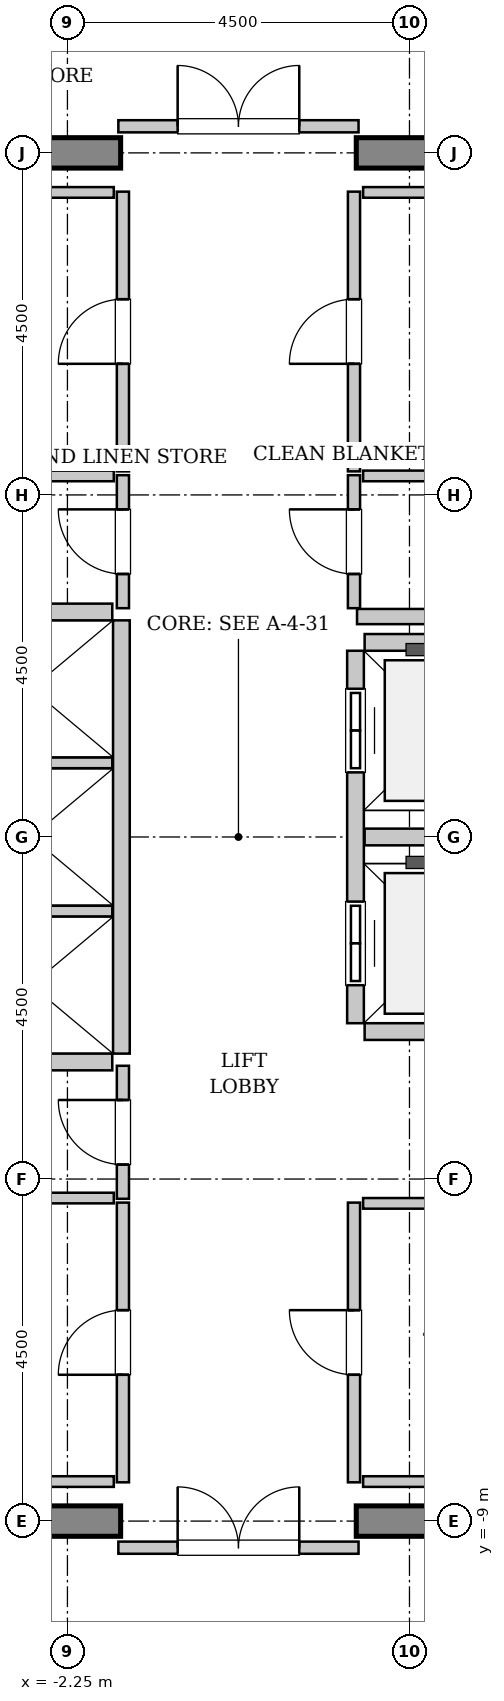
"""IFC4 building model, lengths in metres.
Left out: names, types, materials, properties, quantities, classifications, styles, units other than length and angle.
Written with IfcOpenShell. Run it as: python <this file> out.ifc"""

import sys

from ifc_helpers import new_model, si_unit, direction, frame, frame_2d, origin, place, context, subcontext, project, spatial, rectangle, extrude, source, transform, mapped, element, fill, save


model = new_model("IFC4")
c1 = context("Model", 3, precision=1e-05, world=origin(), true_north=direction((0.0, 1.0)))
c2 = subcontext(c1, "Body", "Model", "MODEL_VIEW")
j1 = project(units=[si_unit("LENGTHUNIT", "METRE"), si_unit("PLANEANGLEUNIT", "RADIAN")], contexts=[c1])
p1 = place(None, origin())
s1 = spatial("IfcSite", under=j1, at=p1, CompositionType="ELEMENT")
p2 = place(p1, origin())
s2 = spatial("IfcBuilding", under=s1, at=p2, CompositionType="ELEMENT")
p3 = place(p2, frame((0.0, 0.0, 349.0)))
s3 = spatial("IfcBuildingStorey", under=s2, at=p3, CompositionType="ELEMENT", Elevation=349.0)
m1 = source(origin(), c2, "Body", "SweptSolid", [
    extrude(rectangle(XDim=9.9, YDim=0.4, at=frame_2d((4.95, 0.0))), origin(), (0.0, 0.0, 1.0), 4.8),
])
for number, where, z_axis, x_axis in (
    (1, (-11.45, 9.0, 0.0), (0.0, 0.0, 1.0), (1.0, 0.0, 0.0)),
    (2, (1.55, 9.0, 0.0), (0.0, 0.0, 1.0), (1.0, 0.0, 0.0)),
    (3, (-11.45, -9.0, 0.0), (0.0, 0.0, 1.0), (1.0, 0.0, 0.0)),
    (4, (1.55, -9.0, 0.0), (0.0, 0.0, 1.0), (1.0, 0.0, 0.0)),
):
    element("IfcWall", number, at=place(p3, frame(where, z_axis=z_axis, x_axis=x_axis)), inside=s3, PredefinedType="SHEAR", context=c2, shape_type="MappedRepresentation", body=[
        mapped(m1, transform((0.0, 0.0, 0.0), x_axis=(1.0, 0.0, 0.0), y_axis=(0.0, 1.0, 0.0), z_axis=(0.0, 0.0, 1.0), scale=1.0)),
    ])
m2 = source(origin(), c2, "Body", "SweptSolid", [
    extrude(rectangle(XDim=5.7, YDim=0.22, at=frame_2d((2.85, 0.0))), origin(), (0.0, 0.0, 1.0), 4.485),
])
p4 = place(p3, frame((-1.54, -2.85, 0.0), z_axis=(0.0, 0.0, 1.0), x_axis=(0.0, 1.0, 0.0)))
e5 = element("IfcWall", 5, at=p4, inside=s3, PredefinedType="SOLIDWALL", context=c2, shape_type="MappedRepresentation", body=[
    mapped(m2, transform((0.0, 0.0, 0.0), x_axis=(1.0, 0.0, 0.0), y_axis=(0.0, 1.0, 0.0), z_axis=(0.0, 0.0, 1.0), scale=1.0)),
])
m3 = source(origin(), c2, "Body", "SweptSolid", [
    extrude(rectangle(XDim=2.13, YDim=0.22, at=frame_2d((1.065, 0.0))), origin(), (0.0, 0.0, 1.0), 4.485),
])
p5 = place(p3, frame((-3.79, -2.96, 0.0), z_axis=(0.0, 0.0, 1.0), x_axis=(1.0, 0.0, 0.0)))
e6 = element("IfcWall", 6, at=p5, inside=s3, PredefinedType="SOLIDWALL", context=c2, shape_type="MappedRepresentation", body=[
    mapped(m3, transform((0.0, 0.0, 0.0), x_axis=(1.0, 0.0, 0.0), y_axis=(0.0, 1.0, 0.0), z_axis=(0.0, 0.0, 1.0), scale=1.0)),
])
m4 = source(origin(), c2, "Body", "SweptSolid", [
    extrude(rectangle(XDim=2.13, YDim=0.14, at=frame_2d((1.065, 0.0))), origin(), (0.0, 0.0, 1.0), 4.485),
])
for number, where, z_axis, x_axis in (
    (7, (-3.79, -0.975, 0.0), (0.0, 0.0, 1.0), (1.0, 0.0, 0.0)),
    (8, (-3.79, 0.975, 0.0), (0.0, 0.0, 1.0), (1.0, 0.0, 0.0)),
):
    element("IfcWall", number, at=place(p3, frame(where, z_axis=z_axis, x_axis=x_axis)), inside=s3, PredefinedType="PARTITIONING", context=c2, shape_type="MappedRepresentation", body=[
        mapped(m4, transform((0.0, 0.0, 0.0), x_axis=(1.0, 0.0, 0.0), y_axis=(0.0, 1.0, 0.0), z_axis=(0.0, 0.0, 1.0), scale=1.0)),
    ])
p6 = place(p3, frame((-1.66, 2.96, 0.0), z_axis=(0.0, 0.0, 1.0), x_axis=(-1.0, 0.0, 0.0)))
e9 = element("IfcWall", 9, at=p6, inside=s3, PredefinedType="SOLIDWALL", context=c2, shape_type="MappedRepresentation", body=[
    mapped(m3, transform((0.0, 0.0, 0.0), x_axis=(1.0, 0.0, 0.0), y_axis=(0.0, 1.0, 0.0), z_axis=(0.0, 0.0, 1.0), scale=1.0)),
])
m5 = source(origin(), c2, "Body", "SweptSolid", [
    extrude(rectangle(XDim=4.9, YDim=0.22, at=frame_2d((2.45, 0.0))), origin(), (0.0, 0.0, 1.0), 4.485),
])
p7 = place(p3, frame((1.54, 2.45, 0.0), z_axis=(0.0, 0.0, 1.0), x_axis=(0.0, -1.0, 0.0)))
e10 = element("IfcWall", 10, at=p7, inside=s3, PredefinedType="SOLIDWALL", context=c2, shape_type="MappedRepresentation", body=[
    mapped(m5, transform((0.0, 0.0, 0.0), x_axis=(1.0, 0.0, 0.0), y_axis=(0.0, 1.0, 0.0), z_axis=(0.0, 0.0, 1.0), scale=1.0)),
])
p8 = place(p7, frame((3.3, 0.0, 0.0)))
e11 = element("IfcOpeningElement", 11, at=p8, cuts=e10, PredefinedType="OPENING", context=c2, shape_type="SweptSolid", body=[
    extrude(rectangle(XDim=1.1, YDim=2.2, at=frame_2d((0.55, 1.1))), frame((0.0, 0.12, 0.0), z_axis=(0.0, -1.0, 0.0), x_axis=(1.0, 0.0, 0.0)), (0.0, 0.0, 1.0), 0.24),
])
p9 = place(p7, frame((0.5, 0.0, 0.0)))
e12 = element("IfcOpeningElement", 12, at=p9, cuts=e10, PredefinedType="OPENING", context=c2, shape_type="SweptSolid", body=[
    extrude(rectangle(XDim=1.1, YDim=2.2, at=frame_2d((0.55, 1.1))), frame((0.0, 0.12, 0.0), z_axis=(0.0, -1.0, 0.0), x_axis=(1.0, 0.0, 0.0)), (0.0, 0.0, 1.0), 0.24),
])
for number, where, z_axis, x_axis in (
    (13, (1.66, -2.56, 0.0), (0.0, 0.0, 1.0), (1.0, 0.0, 0.0)),
    (14, (1.66, 0.0, 0.0), (0.0, 0.0, 1.0), (1.0, 0.0, 0.0)),
    (15, (3.79, 2.56, 0.0), (0.0, 0.0, 1.0), (-1.0, 0.0, 0.0)),
):
    element("IfcWall", number, at=place(p3, frame(where, z_axis=z_axis, x_axis=x_axis)), inside=s3, PredefinedType="SOLIDWALL", context=c2, shape_type="MappedRepresentation", body=[
        mapped(m3, transform((0.0, 0.0, 0.0), x_axis=(1.0, 0.0, 0.0), y_axis=(0.0, 1.0, 0.0), z_axis=(0.0, 0.0, 1.0), scale=1.0)),
    ])
m6 = source(origin(), c2, "Body", "SweptSolid", [
    extrude(rectangle(XDim=2.52, YDim=0.2, at=frame_2d((1.26, 0.0))), origin(), (0.0, 0.0, 1.0), 4.485),
])
p10 = place(p3, frame((1.56, 2.9, 0.0), z_axis=(0.0, 0.0, 1.0), x_axis=(1.0, 0.0, 0.0)))
e16 = element("IfcWall", 16, at=p10, inside=s3, PredefinedType="PARTITIONING", context=c2, shape_type="MappedRepresentation", body=[
    mapped(m6, transform((0.0, 0.0, 0.0), x_axis=(1.0, 0.0, 0.0), y_axis=(0.0, 1.0, 0.0), z_axis=(0.0, 0.0, 1.0), scale=1.0)),
])
m7 = source(origin(), c2, "Body", "SweptSolid", [
    extrude(rectangle(XDim=3.16, YDim=0.16, at=frame_2d((1.58, 0.0))), origin(), (0.0, 0.0, 1.0), 3.575),
])
p11 = place(p3, frame((-1.58, 9.35, 0.0), z_axis=(0.0, 0.0, 1.0), x_axis=(1.0, 0.0, 0.0)))
e17 = element("IfcWall", 17, at=p11, inside=s3, PredefinedType="PARTITIONING", context=c2, shape_type="MappedRepresentation", body=[
    mapped(m7, transform((0.0, 0.0, 0.0), x_axis=(1.0, 0.0, 0.0), y_axis=(0.0, 1.0, 0.0), z_axis=(0.0, 0.0, 1.0), scale=1.0)),
])
p12 = place(p11, frame((0.78, 0.0, 0.0)))
e18 = element("IfcOpeningElement", 18, at=p12, cuts=e17, PredefinedType="OPENING", context=c2, shape_type="SweptSolid", body=[
    extrude(rectangle(XDim=1.6, YDim=2.3, at=frame_2d((0.8, 1.15))), frame((0.0, 0.09, 0.0), z_axis=(0.0, -1.0, 0.0), x_axis=(1.0, 0.0, 0.0)), (0.0, 0.0, 1.0), 0.18),
])
p13 = place(p3, frame((-1.58, -9.35, 0.0), z_axis=(0.0, 0.0, 1.0), x_axis=(1.0, 0.0, 0.0)))
e19 = element("IfcWall", 19, at=p13, inside=s3, PredefinedType="PARTITIONING", context=c2, shape_type="MappedRepresentation", body=[
    mapped(m7, transform((0.0, 0.0, 0.0), x_axis=(1.0, 0.0, 0.0), y_axis=(0.0, 1.0, 0.0), z_axis=(0.0, 0.0, 1.0), scale=1.0)),
])
p14 = place(p13, frame((0.78, 0.0, 0.0)))
e20 = element("IfcOpeningElement", 20, at=p14, cuts=e19, PredefinedType="OPENING", context=c2, shape_type="SweptSolid", body=[
    extrude(rectangle(XDim=1.6, YDim=2.3, at=frame_2d((0.8, 1.15))), frame((0.0, 0.09, 0.0), z_axis=(0.0, -1.0, 0.0), x_axis=(1.0, 0.0, 0.0)), (0.0, 0.0, 1.0), 0.18),
])
m8 = source(origin(), c2, "Body", "SweptSolid", [
    extrude(rectangle(XDim=1.75, YDim=0.16, at=frame_2d((0.875, 0.0))), origin(), (0.0, 0.0, 1.0), 4.485),
])
p15 = place(p3, frame((-1.52, 3.01, 0.0), z_axis=(0.0, 0.0, 1.0), x_axis=(0.0, 1.0, 0.0)))
e21 = element("IfcWall", 21, at=p15, inside=s3, PredefinedType="PARTITIONING", context=c2, shape_type="MappedRepresentation", body=[
    mapped(m8, transform((0.0, 0.0, 0.0), x_axis=(1.0, 0.0, 0.0), y_axis=(0.0, 1.0, 0.0), z_axis=(0.0, 0.0, 1.0), scale=1.0)),
])
p16 = place(p15, frame((0.45, 0.0, 0.0)))
e22 = element("IfcOpeningElement", 22, at=p16, cuts=e21, PredefinedType="OPENING", context=c2, shape_type="SweptSolid", body=[
    extrude(rectangle(XDim=0.85, YDim=2.1, at=frame_2d((0.425, 1.05))), frame((0.0, 0.09, 0.0), z_axis=(0.0, -1.0, 0.0), x_axis=(1.0, 0.0, 0.0)), (0.0, 0.0, 1.0), 0.18),
])
m9 = source(origin(), c2, "Body", "SweptSolid", [
    extrude(rectangle(XDim=2.95, YDim=0.14, at=frame_2d((1.475, 0.0))), origin(), (0.0, 0.0, 1.0), 4.485),
])
p17 = place(p3, frame((-4.59, 4.75, 0.0), z_axis=(0.0, 0.0, 1.0), x_axis=(1.0, 0.0, 0.0)))
e23 = element("IfcWall", 23, at=p17, inside=s3, PredefinedType="PARTITIONING", context=c2, shape_type="MappedRepresentation", body=[
    mapped(m9, transform((0.0, 0.0, 0.0), x_axis=(1.0, 0.0, 0.0), y_axis=(0.0, 1.0, 0.0), z_axis=(0.0, 0.0, 1.0), scale=1.0)),
])
m10 = source(origin(), c2, "Body", "SweptSolid", [
    extrude(rectangle(XDim=3.68, YDim=0.16, at=frame_2d((1.84, 0.0))), origin(), (0.0, 0.0, 1.0), 4.485),
])
p18 = place(p3, frame((-1.52, 4.81, 0.0), z_axis=(0.0, 0.0, 1.0), x_axis=(0.0, 1.0, 0.0)))
e24 = element("IfcWall", 24, at=p18, inside=s3, PredefinedType="PARTITIONING", context=c2, shape_type="MappedRepresentation", body=[
    mapped(m10, transform((0.0, 0.0, 0.0), x_axis=(1.0, 0.0, 0.0), y_axis=(0.0, 1.0, 0.0), z_axis=(0.0, 0.0, 1.0), scale=1.0)),
])
p19 = place(p18, frame((1.415, 0.0, 0.0)))
e25 = element("IfcOpeningElement", 25, at=p19, cuts=e24, PredefinedType="OPENING", context=c2, shape_type="SweptSolid", body=[
    extrude(rectangle(XDim=0.85, YDim=2.1, at=frame_2d((0.425, 1.05))), frame((0.0, 0.09, 0.0), z_axis=(0.0, -1.0, 0.0), x_axis=(1.0, 0.0, 0.0)), (0.0, 0.0, 1.0), 0.18),
])
m11 = source(origin(), c2, "Body", "SweptSolid", [
    extrude(rectangle(XDim=3.15, YDim=0.14, at=frame_2d((1.575, 0.0))), origin(), (0.0, 0.0, 1.0), 4.485),
])
p20 = place(p3, frame((-4.79, 8.48, 0.0), z_axis=(0.0, 0.0, 1.0), x_axis=(1.0, 0.0, 0.0)))
e26 = element("IfcWall", 26, at=p20, inside=s3, PredefinedType="PARTITIONING", context=c2, shape_type="MappedRepresentation", body=[
    mapped(m11, transform((0.0, 0.0, 0.0), x_axis=(1.0, 0.0, 0.0), y_axis=(0.0, 1.0, 0.0), z_axis=(0.0, 0.0, 1.0), scale=1.0)),
])
p21 = place(p3, frame((1.52, 3.01, 0.0), z_axis=(0.0, 0.0, 1.0), x_axis=(0.0, 1.0, 0.0)))
e27 = element("IfcWall", 27, at=p21, inside=s3, PredefinedType="PARTITIONING", context=c2, shape_type="MappedRepresentation", body=[
    mapped(m8, transform((0.0, 0.0, 0.0), x_axis=(1.0, 0.0, 0.0), y_axis=(0.0, 1.0, 0.0), z_axis=(0.0, 0.0, 1.0), scale=1.0)),
])
p22 = place(p21, frame((0.45, 0.0, 0.0)))
e28 = element("IfcOpeningElement", 28, at=p22, cuts=e27, PredefinedType="OPENING", context=c2, shape_type="SweptSolid", body=[
    extrude(rectangle(XDim=0.85, YDim=2.1, at=frame_2d((0.425, 1.05))), frame((0.0, 0.09, 0.0), z_axis=(0.0, -1.0, 0.0), x_axis=(1.0, 0.0, 0.0)), (0.0, 0.0, 1.0), 0.18),
])
p23 = place(p3, frame((1.64, 4.75, 0.0), z_axis=(0.0, 0.0, 1.0), x_axis=(1.0, 0.0, 0.0)))
e29 = element("IfcWall", 29, at=p23, inside=s3, PredefinedType="PARTITIONING", context=c2, shape_type="MappedRepresentation", body=[
    mapped(m11, transform((0.0, 0.0, 0.0), x_axis=(1.0, 0.0, 0.0), y_axis=(0.0, 1.0, 0.0), z_axis=(0.0, 0.0, 1.0), scale=1.0)),
])
p24 = place(p3, frame((1.52, 4.81, 0.0), z_axis=(0.0, 0.0, 1.0), x_axis=(0.0, 1.0, 0.0)))
e30 = element("IfcWall", 30, at=p24, inside=s3, PredefinedType="PARTITIONING", context=c2, shape_type="MappedRepresentation", body=[
    mapped(m10, transform((0.0, 0.0, 0.0), x_axis=(1.0, 0.0, 0.0), y_axis=(0.0, 1.0, 0.0), z_axis=(0.0, 0.0, 1.0), scale=1.0)),
])
p25 = place(p24, frame((1.415, 0.0, 0.0)))
e31 = element("IfcOpeningElement", 31, at=p25, cuts=e30, PredefinedType="OPENING", context=c2, shape_type="SweptSolid", body=[
    extrude(rectangle(XDim=0.85, YDim=2.1, at=frame_2d((0.425, 1.05))), frame((0.0, 0.09, 0.0), z_axis=(0.0, -1.0, 0.0), x_axis=(1.0, 0.0, 0.0)), (0.0, 0.0, 1.0), 0.18),
])
p26 = place(p3, frame((1.64, 8.48, 0.0), z_axis=(0.0, 0.0, 1.0), x_axis=(1.0, 0.0, 0.0)))
e32 = element("IfcWall", 32, at=p26, inside=s3, PredefinedType="PARTITIONING", context=c2, shape_type="MappedRepresentation", body=[
    mapped(m11, transform((0.0, 0.0, 0.0), x_axis=(1.0, 0.0, 0.0), y_axis=(0.0, 1.0, 0.0), z_axis=(0.0, 0.0, 1.0), scale=1.0)),
])
p27 = place(p3, frame((-1.52, -4.76, 0.0), z_axis=(0.0, 0.0, 1.0), x_axis=(0.0, 1.0, 0.0)))
e33 = element("IfcWall", 33, at=p27, inside=s3, PredefinedType="PARTITIONING", context=c2, shape_type="MappedRepresentation", body=[
    mapped(m8, transform((0.0, 0.0, 0.0), x_axis=(1.0, 0.0, 0.0), y_axis=(0.0, 1.0, 0.0), z_axis=(0.0, 0.0, 1.0), scale=1.0)),
])
p28 = place(p27, frame((0.45, 0.0, 0.0)))
e34 = element("IfcOpeningElement", 34, at=p28, cuts=e33, PredefinedType="OPENING", context=c2, shape_type="SweptSolid", body=[
    extrude(rectangle(XDim=0.85, YDim=2.1, at=frame_2d((0.425, 1.05))), frame((0.0, 0.09, 0.0), z_axis=(0.0, -1.0, 0.0), x_axis=(1.0, 0.0, 0.0)), (0.0, 0.0, 1.0), 0.18),
])
p29 = place(p3, frame((-4.79, -4.75, 0.0), z_axis=(0.0, 0.0, 1.0), x_axis=(1.0, 0.0, 0.0)))
e35 = element("IfcWall", 35, at=p29, inside=s3, PredefinedType="PARTITIONING", context=c2, shape_type="MappedRepresentation", body=[
    mapped(m11, transform((0.0, 0.0, 0.0), x_axis=(1.0, 0.0, 0.0), y_axis=(0.0, 1.0, 0.0), z_axis=(0.0, 0.0, 1.0), scale=1.0)),
])
p30 = place(p3, frame((-1.52, -8.49, 0.0), z_axis=(0.0, 0.0, 1.0), x_axis=(0.0, 1.0, 0.0)))
e36 = element("IfcWall", 36, at=p30, inside=s3, PredefinedType="PARTITIONING", context=c2, shape_type="MappedRepresentation", body=[
    mapped(m10, transform((0.0, 0.0, 0.0), x_axis=(1.0, 0.0, 0.0), y_axis=(0.0, 1.0, 0.0), z_axis=(0.0, 0.0, 1.0), scale=1.0)),
])
p31 = place(p30, frame((1.415, 0.0, 0.0)))
e37 = element("IfcOpeningElement", 37, at=p31, cuts=e36, PredefinedType="OPENING", context=c2, shape_type="SweptSolid", body=[
    extrude(rectangle(XDim=0.85, YDim=2.1, at=frame_2d((0.425, 1.05))), frame((0.0, 0.09, 0.0), z_axis=(0.0, -1.0, 0.0), x_axis=(1.0, 0.0, 0.0)), (0.0, 0.0, 1.0), 0.18),
])
m12 = source(origin(), c2, "Body", "SweptSolid", [
    extrude(rectangle(XDim=3.03, YDim=0.14, at=frame_2d((1.515, 0.0))), origin(), (0.0, 0.0, 1.0), 4.485),
])
p32 = place(p3, frame((-4.67, -8.48, 0.0), z_axis=(0.0, 0.0, 1.0), x_axis=(1.0, 0.0, 0.0)))
e38 = element("IfcWall", 38, at=p32, inside=s3, PredefinedType="PARTITIONING", context=c2, shape_type="MappedRepresentation", body=[
    mapped(m12, transform((0.0, 0.0, 0.0), x_axis=(1.0, 0.0, 0.0), y_axis=(0.0, 1.0, 0.0), z_axis=(0.0, 0.0, 1.0), scale=1.0)),
])
p33 = place(p3, frame((1.52, -8.49, 0.0), z_axis=(0.0, 0.0, 1.0), x_axis=(0.0, 1.0, 0.0)))
e39 = element("IfcWall", 39, at=p33, inside=s3, PredefinedType="PARTITIONING", context=c2, shape_type="MappedRepresentation", body=[
    mapped(m10, transform((0.0, 0.0, 0.0), x_axis=(1.0, 0.0, 0.0), y_axis=(0.0, 1.0, 0.0), z_axis=(0.0, 0.0, 1.0), scale=1.0)),
])
p34 = place(p33, frame((1.415, 0.0, 0.0)))
e40 = element("IfcOpeningElement", 40, at=p34, cuts=e39, PredefinedType="OPENING", context=c2, shape_type="SweptSolid", body=[
    extrude(rectangle(XDim=0.85, YDim=2.1, at=frame_2d((0.425, 1.05))), frame((0.0, 0.09, 0.0), z_axis=(0.0, -1.0, 0.0), x_axis=(1.0, 0.0, 0.0)), (0.0, 0.0, 1.0), 0.18),
])
p35 = place(p3, frame((1.64, -4.82, 0.0), z_axis=(0.0, 0.0, 1.0), x_axis=(1.0, 0.0, 0.0)))
e41 = element("IfcWall", 41, at=p35, inside=s3, PredefinedType="PARTITIONING", context=c2, shape_type="MappedRepresentation", body=[
    mapped(m9, transform((0.0, 0.0, 0.0), x_axis=(1.0, 0.0, 0.0), y_axis=(0.0, 1.0, 0.0), z_axis=(0.0, 0.0, 1.0), scale=1.0)),
])
p36 = place(p3, frame((1.64, -8.48, 0.0), z_axis=(0.0, 0.0, 1.0), x_axis=(1.0, 0.0, 0.0)))
e42 = element("IfcWall", 42, at=p36, inside=s3, PredefinedType="PARTITIONING", context=c2, shape_type="MappedRepresentation", body=[
    mapped(m11, transform((0.0, 0.0, 0.0), x_axis=(1.0, 0.0, 0.0), y_axis=(0.0, 1.0, 0.0), z_axis=(0.0, 0.0, 1.0), scale=1.0)),
])
m13 = source(origin(), c2, "Body", "SweptSolid", [
    extrude(rectangle(XDim=1.1, YDim=2.2, at=frame_2d((0.55, 1.1))), frame((0.0, 0.025, 0.0), z_axis=(0.0, -1.0, 0.0), x_axis=(1.0, 0.0, 0.0)), (0.0, 0.0, 1.0), 0.05),
])
p37 = place(p8, origin())
e43 = element("IfcDoor", 43, at=p37, inside=s3, OperationType="DOUBLE_DOOR_SLIDING", PredefinedType="DOOR", context=c2, shape_type="MappedRepresentation", body=[
    mapped(m13, transform((0.0, 0.0, 0.0), x_axis=(1.0, 0.0, 0.0), y_axis=(0.0, 1.0, 0.0), z_axis=(0.0, 0.0, 1.0), scale=1.0)),
])
fill(e11, e43)
p38 = place(p9, origin())
e44 = element("IfcDoor", 44, at=p38, inside=s3, OperationType="DOUBLE_DOOR_SLIDING", PredefinedType="DOOR", context=c2, shape_type="MappedRepresentation", body=[
    mapped(m13, transform((0.0, 0.0, 0.0), x_axis=(1.0, 0.0, 0.0), y_axis=(0.0, 1.0, 0.0), z_axis=(0.0, 0.0, 1.0), scale=1.0)),
])
fill(e12, e44)
m14 = source(origin(), c2, "Body", "SweptSolid", [
    extrude(rectangle(XDim=1.6, YDim=2.3, at=frame_2d((0.8, 1.15))), frame((0.0, 0.025, 0.0), z_axis=(0.0, -1.0, 0.0), x_axis=(1.0, 0.0, 0.0)), (0.0, 0.0, 1.0), 0.05),
])
p39 = place(p12, origin())
e45 = element("IfcDoor", 45, at=p39, inside=s3, OperationType="DOUBLE_DOOR_SINGLE_SWING", PredefinedType="DOOR", context=c2, shape_type="MappedRepresentation", body=[
    mapped(m14, transform((0.0, 0.0, 0.0), x_axis=(1.0, 0.0, 0.0), y_axis=(0.0, 1.0, 0.0), z_axis=(0.0, 0.0, 1.0), scale=1.0)),
])
fill(e18, e45)
p40 = place(p14, origin())
e46 = element("IfcDoor", 46, at=p40, inside=s3, OperationType="DOUBLE_DOOR_SINGLE_SWING", PredefinedType="DOOR", context=c2, shape_type="MappedRepresentation", body=[
    mapped(m14, transform((0.0, 0.0, 0.0), x_axis=(1.0, 0.0, 0.0), y_axis=(0.0, 1.0, 0.0), z_axis=(0.0, 0.0, 1.0), scale=1.0)),
])
fill(e20, e46)
m15 = source(origin(), c2, "Body", "SweptSolid", [
    extrude(rectangle(XDim=0.85, YDim=2.1, at=frame_2d((0.425, 1.05))), frame((0.0, 0.025, 0.0), z_axis=(0.0, -1.0, 0.0), x_axis=(1.0, 0.0, 0.0)), (0.0, 0.0, 1.0), 0.05),
])
p41 = place(p16, origin())
e47 = element("IfcDoor", 47, at=p41, inside=s3, OperationType="SINGLE_SWING_RIGHT", PredefinedType="DOOR", context=c2, shape_type="MappedRepresentation", body=[
    mapped(m15, transform((0.0, 0.0, 0.0), x_axis=(1.0, 0.0, 0.0), y_axis=(0.0, 1.0, 0.0), z_axis=(0.0, 0.0, 1.0), scale=1.0)),
])
fill(e22, e47)
p42 = place(p19, origin())
e48 = element("IfcDoor", 48, at=p42, inside=s3, OperationType="SINGLE_SWING_LEFT", PredefinedType="DOOR", context=c2, shape_type="MappedRepresentation", body=[
    mapped(m15, transform((0.0, 0.0, 0.0), x_axis=(1.0, 0.0, 0.0), y_axis=(0.0, 1.0, 0.0), z_axis=(0.0, 0.0, 1.0), scale=1.0)),
])
fill(e25, e48)
p43 = place(p22, origin())
e49 = element("IfcDoor", 49, at=p43, inside=s3, OperationType="SINGLE_SWING_RIGHT", PredefinedType="DOOR", context=c2, shape_type="MappedRepresentation", body=[
    mapped(m15, transform((0.0, 0.0, 0.0), x_axis=(1.0, 0.0, 0.0), y_axis=(0.0, 1.0, 0.0), z_axis=(0.0, 0.0, 1.0), scale=1.0)),
])
fill(e28, e49)
p44 = place(p25, origin())
e50 = element("IfcDoor", 50, at=p44, inside=s3, OperationType="SINGLE_SWING_LEFT", PredefinedType="DOOR", context=c2, shape_type="MappedRepresentation", body=[
    mapped(m15, transform((0.0, 0.0, 0.0), x_axis=(1.0, 0.0, 0.0), y_axis=(0.0, 1.0, 0.0), z_axis=(0.0, 0.0, 1.0), scale=1.0)),
])
fill(e31, e50)
p45 = place(p28, origin())
e51 = element("IfcDoor", 51, at=p45, inside=s3, OperationType="SINGLE_SWING_RIGHT", PredefinedType="DOOR", context=c2, shape_type="MappedRepresentation", body=[
    mapped(m15, transform((0.0, 0.0, 0.0), x_axis=(1.0, 0.0, 0.0), y_axis=(0.0, 1.0, 0.0), z_axis=(0.0, 0.0, 1.0), scale=1.0)),
])
fill(e34, e51)
p46 = place(p31, origin())
e52 = element("IfcDoor", 52, at=p46, inside=s3, OperationType="SINGLE_SWING_LEFT", PredefinedType="DOOR", context=c2, shape_type="MappedRepresentation", body=[
    mapped(m15, transform((0.0, 0.0, 0.0), x_axis=(1.0, 0.0, 0.0), y_axis=(0.0, 1.0, 0.0), z_axis=(0.0, 0.0, 1.0), scale=1.0)),
])
fill(e37, e52)
p47 = place(p34, origin())
e53 = element("IfcDoor", 53, at=p47, inside=s3, OperationType="SINGLE_SWING_RIGHT", PredefinedType="DOOR", context=c2, shape_type="MappedRepresentation", body=[
    mapped(m15, transform((0.0, 0.0, 0.0), x_axis=(1.0, 0.0, 0.0), y_axis=(0.0, 1.0, 0.0), z_axis=(0.0, 0.0, 1.0), scale=1.0)),
])
fill(e40, e53)
save(model, sys.argv[1])
